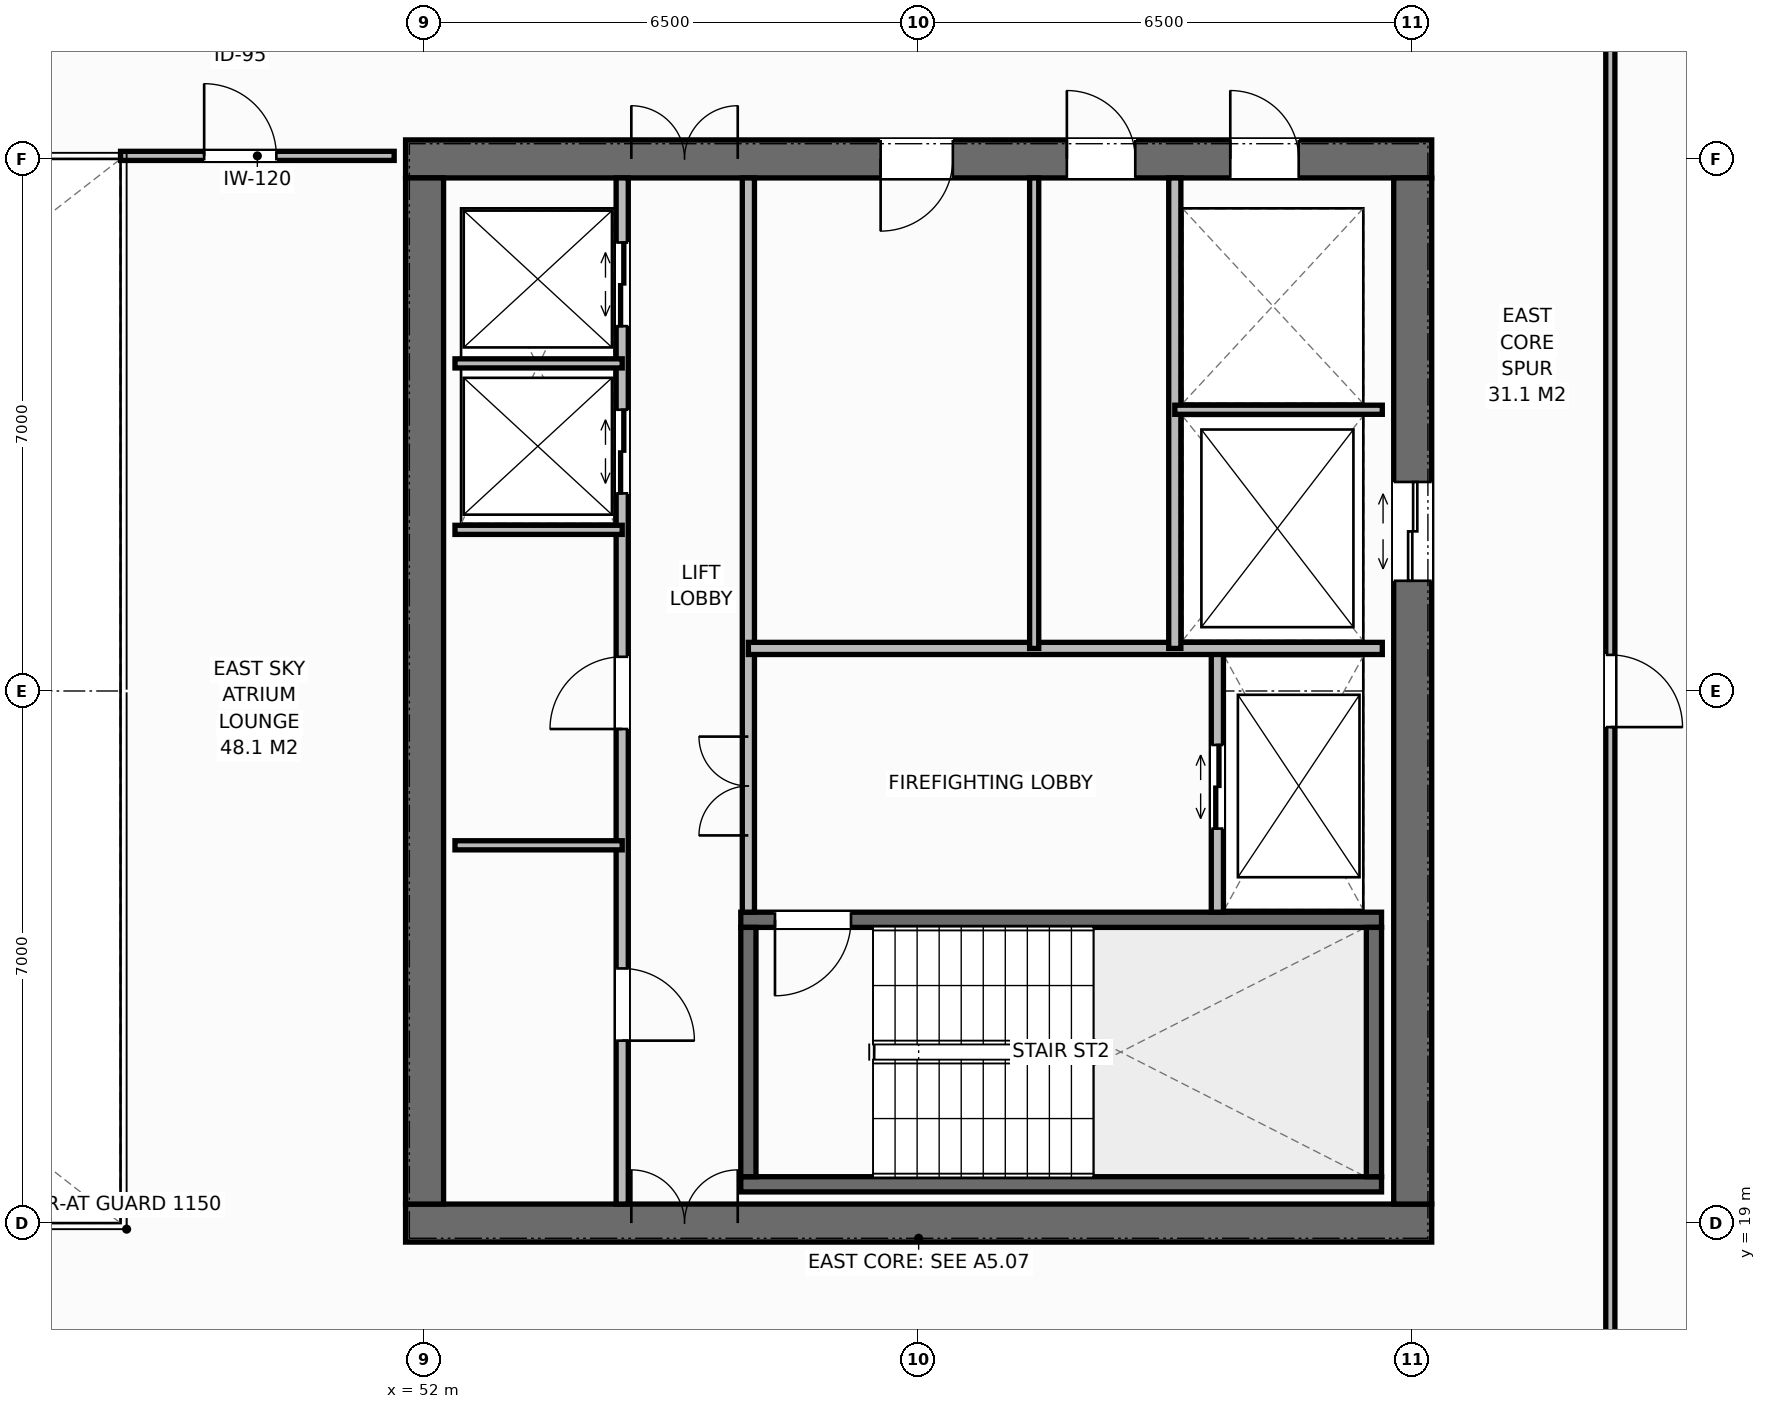
"""IFC4 building model, lengths in metres.
Left out: names, types, materials, properties, quantities, classifications, styles, units other than length and angle.
Written with IfcOpenShell. Run it as: python <this file> out.ifc"""

import sys

from ifc_helpers import new_model, si_unit, direction, frame, frame_2d, origin, place, context, subcontext, project, spatial, rectangle, extrude, element, fill, save


model = new_model("IFC4")
c1 = context("Model", 3, precision=1e-05, world=origin(), true_north=direction((0.0, 1.0)))
c2 = subcontext(c1, "Body", "Model", "MODEL_VIEW")
j1 = project(units=[si_unit("LENGTHUNIT", "METRE"), si_unit("PLANEANGLEUNIT", "RADIAN")], contexts=[c1])
p1 = place(None, origin())
s1 = spatial("IfcSite", under=j1, at=p1, CompositionType="ELEMENT")
p2 = place(p1, origin())
s2 = spatial("IfcBuilding", under=s1, at=p2, CompositionType="ELEMENT")
p3 = place(p2, frame((0.0, 0.0, 229.0)))
s3 = spatial("IfcBuildingStorey", under=s2, at=p3, CompositionType="ELEMENT", Elevation=229.0)
p4 = place(p3, frame((51.75, 19.0, 0.0), z_axis=(0.0, 0.0, 1.0), x_axis=(1.0, 0.0, 0.0)))
e1 = element("IfcWall", 1, at=p4, inside=s3, PredefinedType="SHEAR", context=c2, shape_type="SweptSolid", body=[
    extrude(rectangle(XDim=13.5, YDim=0.5, at=frame_2d((6.75, 0.0))), origin(), (0.0, 0.0, 1.0), 3.8),
])
p5 = place(p4, frame((2.97, 0.0, 0.0)))
e2 = element("IfcOpeningElement", 2, at=p5, cuts=e1, PredefinedType="OPENING", context=c2, shape_type="SweptSolid", body=[
    extrude(rectangle(XDim=1.4, YDim=2.2, at=frame_2d((0.7, 1.1))), frame((0.0, 0.26, 0.0), z_axis=(0.0, -1.0, 0.0), x_axis=(1.0, 0.0, 0.0)), (0.0, 0.0, 1.0), 0.52),
])
p6 = place(p3, frame((51.75, 33.0, 0.0), z_axis=(0.0, 0.0, 1.0), x_axis=(1.0, 0.0, 0.0)))
e3 = element("IfcWall", 3, at=p6, inside=s3, PredefinedType="SHEAR", context=c2, shape_type="SweptSolid", body=[
    extrude(rectangle(XDim=13.5, YDim=0.5, at=frame_2d((6.75, 0.0))), origin(), (0.0, 0.0, 1.0), 3.8),
])
p7 = place(p6, frame((2.97, 0.0, 0.0)))
e4 = element("IfcOpeningElement", 4, at=p7, cuts=e3, PredefinedType="OPENING", context=c2, shape_type="SweptSolid", body=[
    extrude(rectangle(XDim=1.4, YDim=2.2, at=frame_2d((0.7, 1.1))), frame((0.0, 0.26, 0.0), z_axis=(0.0, -1.0, 0.0), x_axis=(1.0, 0.0, 0.0)), (0.0, 0.0, 1.0), 0.52),
])
p8 = place(p6, frame((10.85, 0.0, 0.0)))
e5 = element("IfcOpeningElement", 5, at=p8, cuts=e3, PredefinedType="OPENING", context=c2, shape_type="SweptSolid", body=[
    extrude(rectangle(XDim=0.9, YDim=2.15, at=frame_2d((0.45, 1.075))), frame((0.0, 0.26, 0.0), z_axis=(0.0, -1.0, 0.0), x_axis=(1.0, 0.0, 0.0)), (0.0, 0.0, 1.0), 0.52),
])
p9 = place(p6, frame((6.25, 0.0, 0.0)))
e6 = element("IfcOpeningElement", 6, at=p9, cuts=e3, PredefinedType="OPENING", context=c2, shape_type="SweptSolid", body=[
    extrude(rectangle(XDim=0.95, YDim=2.15, at=frame_2d((0.475, 1.075))), frame((0.0, 0.26, 0.0), z_axis=(0.0, -1.0, 0.0), x_axis=(1.0, 0.0, 0.0)), (0.0, 0.0, 1.0), 0.52),
])
p10 = place(p6, frame((8.7, 0.0, 0.0)))
e7 = element("IfcOpeningElement", 7, at=p10, cuts=e3, PredefinedType="OPENING", context=c2, shape_type="SweptSolid", body=[
    extrude(rectangle(XDim=0.9, YDim=2.15, at=frame_2d((0.45, 1.075))), frame((0.0, 0.26, 0.0), z_axis=(0.0, -1.0, 0.0), x_axis=(1.0, 0.0, 0.0)), (0.0, 0.0, 1.0), 0.52),
])
p11 = place(p3, frame((52.0, 19.25, 0.0), z_axis=(0.0, 0.0, 1.0), x_axis=(0.0, 1.0, 0.0)))
e8 = element("IfcWall", 8, at=p11, inside=s3, PredefinedType="SHEAR", context=c2, shape_type="SweptSolid", body=[
    extrude(rectangle(XDim=13.5, YDim=0.5, at=frame_2d((6.75, 0.0))), origin(), (0.0, 0.0, 1.0), 3.8),
])
p12 = place(p3, frame((65.0, 19.25, 0.0), z_axis=(0.0, 0.0, 1.0), x_axis=(0.0, 1.0, 0.0)))
e9 = element("IfcWall", 9, at=p12, inside=s3, PredefinedType="SHEAR", context=c2, shape_type="SweptSolid", body=[
    extrude(rectangle(XDim=13.5, YDim=0.5, at=frame_2d((6.75, 0.0))), origin(), (0.0, 0.0, 1.0), 3.8),
])
p13 = place(p12, frame((8.2, 0.0, 0.0)))
e10 = element("IfcOpeningElement", 10, at=p13, cuts=e9, PredefinedType="OPENING", context=c2, shape_type="SweptSolid", body=[
    extrude(rectangle(XDim=1.3, YDim=2.2, at=frame_2d((0.65, 1.1))), frame((0.0, 0.26, 0.0), z_axis=(0.0, -1.0, 0.0), x_axis=(1.0, 0.0, 0.0)), (0.0, 0.0, 1.0), 0.52),
])
p14 = place(p3, frame((56.16, 19.51, 0.0), z_axis=(0.0, 0.0, 1.0), x_axis=(1.0, 0.0, 0.0)))
e11 = element("IfcWall", 11, at=p14, inside=s3, PredefinedType="SHEAR", context=c2, shape_type="SweptSolid", body=[
    extrude(rectangle(XDim=8.43, YDim=0.2, at=frame_2d((4.215, 0.0))), origin(), (0.0, 0.0, 1.0), 3.8),
])
p15 = place(p3, frame((56.16, 22.99, 0.0), z_axis=(0.0, 0.0, 1.0), x_axis=(1.0, 0.0, 0.0)))
e12 = element("IfcWall", 12, at=p15, inside=s3, PredefinedType="SHEAR", context=c2, shape_type="SweptSolid", body=[
    extrude(rectangle(XDim=8.43, YDim=0.2, at=frame_2d((4.215, 0.0))), origin(), (0.0, 0.0, 1.0), 3.8),
])
p16 = place(p15, frame((0.45, 0.0, 0.0)))
e13 = element("IfcOpeningElement", 13, at=p16, cuts=e12, PredefinedType="OPENING", context=c2, shape_type="SweptSolid", body=[
    extrude(rectangle(XDim=1.0, YDim=2.15, at=frame_2d((0.5, 1.075))), frame((0.0, 0.11, 0.0), z_axis=(0.0, -1.0, 0.0), x_axis=(1.0, 0.0, 0.0)), (0.0, 0.0, 1.0), 0.22),
])
for number, where, z_axis, x_axis in (
    (14, (56.26, 19.61, 0.0), (0.0, 0.0, 1.0), (0.0, 1.0, 0.0)),
    (15, (64.49, 19.61, 0.0), (0.0, 0.0, 1.0), (0.0, 1.0, 0.0)),
):
    element("IfcWall", number, at=place(p3, frame(where, z_axis=z_axis, x_axis=x_axis)), inside=s3, PredefinedType="SHEAR", context=c2, shape_type="SweptSolid", body=[
        extrude(rectangle(XDim=3.28, YDim=0.2, at=frame_2d((1.64, 0.0))), origin(), (0.0, 0.0, 1.0), 3.8),
    ])
p17 = place(p3, frame((54.6, 19.25, 0.0), z_axis=(0.0, 0.0, 1.0), x_axis=(0.0, 1.0, 0.0)))
e16 = element("IfcWall", 16, at=p17, inside=s3, PredefinedType="STANDARD", context=c2, shape_type="SweptSolid", body=[
    extrude(rectangle(XDim=13.5, YDim=0.16, at=frame_2d((6.75, 0.0))), origin(), (0.0, 0.0, 1.0), 3.58),
])
p18 = place(p17, frame((2.15, 0.0, 0.0)))
e17 = element("IfcOpeningElement", 17, at=p18, cuts=e16, PredefinedType="OPENING", context=c2, shape_type="SweptSolid", body=[
    extrude(rectangle(XDim=0.95, YDim=2.15, at=frame_2d((0.475, 1.075))), frame((0.0, 0.09, 0.0), z_axis=(0.0, -1.0, 0.0), x_axis=(1.0, 0.0, 0.0)), (0.0, 0.0, 1.0), 0.18),
])
p19 = place(p17, frame((6.25, 0.0, 0.0)))
e18 = element("IfcOpeningElement", 18, at=p19, cuts=e16, PredefinedType="OPENING", context=c2, shape_type="SweptSolid", body=[
    extrude(rectangle(XDim=0.95, YDim=2.15, at=frame_2d((0.475, 1.075))), frame((0.0, 0.09, 0.0), z_axis=(0.0, -1.0, 0.0), x_axis=(1.0, 0.0, 0.0)), (0.0, 0.0, 1.0), 0.18),
])
p20 = place(p17, frame((9.35, 0.0, 0.0)))
e19 = element("IfcOpeningElement", 19, at=p20, cuts=e16, PredefinedType="OPENING", context=c2, shape_type="SweptSolid", body=[
    extrude(rectangle(XDim=1.1, YDim=2.2, at=frame_2d((0.55, 1.1))), frame((0.0, 0.09, 0.0), z_axis=(0.0, -1.0, 0.0), x_axis=(1.0, 0.0, 0.0)), (0.0, 0.0, 1.0), 0.18),
])
p21 = place(p17, frame((11.55, 0.0, 0.0)))
e20 = element("IfcOpeningElement", 20, at=p21, cuts=e16, PredefinedType="OPENING", context=c2, shape_type="SweptSolid", body=[
    extrude(rectangle(XDim=1.1, YDim=2.2, at=frame_2d((0.55, 1.1))), frame((0.0, 0.09, 0.0), z_axis=(0.0, -1.0, 0.0), x_axis=(1.0, 0.0, 0.0)), (0.0, 0.0, 1.0), 0.18),
])
p22 = place(p3, frame((56.26, 23.09, 0.0), z_axis=(0.0, 0.0, 1.0), x_axis=(0.0, 1.0, 0.0)))
e21 = element("IfcWall", 21, at=p22, inside=s3, PredefinedType="STANDARD", context=c2, shape_type="SweptSolid", body=[
    extrude(rectangle(XDim=9.66, YDim=0.16, at=frame_2d((4.83, 0.0))), origin(), (0.0, 0.0, 1.0), 3.58),
])
p23 = place(p22, frame((1.01, 0.0, 0.0)))
e22 = element("IfcOpeningElement", 22, at=p23, cuts=e21, PredefinedType="OPENING", context=c2, shape_type="SweptSolid", body=[
    extrude(rectangle(XDim=1.3, YDim=2.2, at=frame_2d((0.65, 1.1))), frame((0.0, 0.09, 0.0), z_axis=(0.0, -1.0, 0.0), x_axis=(1.0, 0.0, 0.0)), (0.0, 0.0, 1.0), 0.18),
])
for number, where, z_axis, x_axis in (
    (23, (52.4, 23.97, 0.0), (0.0, 0.0, 1.0), (1.0, 0.0, 0.0)),
    (24, (52.4, 28.12, 0.0), (0.0, 0.0, 1.0), (1.0, 0.0, 0.0)),
    (25, (52.4, 30.31, 0.0), (0.0, 0.0, 1.0), (1.0, 0.0, 0.0)),
):
    element("IfcWall", number, at=place(p3, frame(where, z_axis=z_axis, x_axis=x_axis)), inside=s3, PredefinedType="PARTITIONING", context=c2, shape_type="SweptSolid", body=[
        extrude(rectangle(XDim=2.2, YDim=0.12, at=frame_2d((1.1, 0.0))), origin(), (0.0, 0.0, 1.0), 3.58),
    ])
p24 = place(p3, frame((62.43, 23.09, 0.0), z_axis=(0.0, 0.0, 1.0), x_axis=(0.0, 1.0, 0.0)))
e26 = element("IfcWall", 26, at=p24, inside=s3, PredefinedType="STANDARD", context=c2, shape_type="SweptSolid", body=[
    extrude(rectangle(XDim=3.47, YDim=0.16, at=frame_2d((1.735, 0.0))), origin(), (0.0, 0.0, 1.0), 3.58),
])
p25 = place(p24, frame((1.1, 0.0, 0.0)))
e27 = element("IfcOpeningElement", 27, at=p25, cuts=e26, PredefinedType="OPENING", context=c2, shape_type="SweptSolid", body=[
    extrude(rectangle(XDim=1.1, YDim=2.2, at=frame_2d((0.55, 1.1))), frame((0.0, 0.09, 0.0), z_axis=(0.0, -1.0, 0.0), x_axis=(1.0, 0.0, 0.0)), (0.0, 0.0, 1.0), 0.18),
])
p26 = place(p3, frame((56.26, 26.56, 0.0), z_axis=(0.0, 0.0, 1.0), x_axis=(1.0, 0.0, 0.0)))
e28 = element("IfcWall", 28, at=p26, inside=s3, PredefinedType="STANDARD", context=c2, shape_type="SweptSolid", body=[
    extrude(rectangle(XDim=8.34, YDim=0.16, at=frame_2d((4.17, 0.0))), origin(), (0.0, 0.0, 1.0), 3.58),
])
p27 = place(p3, frame((61.87, 26.56, 0.0), z_axis=(0.0, 0.0, 1.0), x_axis=(0.0, 1.0, 0.0)))
e29 = element("IfcWall", 29, at=p27, inside=s3, PredefinedType="STANDARD", context=c2, shape_type="SweptSolid", body=[
    extrude(rectangle(XDim=6.19, YDim=0.16, at=frame_2d((3.095, 0.0))), origin(), (0.0, 0.0, 1.0), 3.58),
])
p28 = place(p3, frame((61.87, 29.7, 0.0), z_axis=(0.0, 0.0, 1.0), x_axis=(1.0, 0.0, 0.0)))
e30 = element("IfcWall", 30, at=p28, inside=s3, PredefinedType="PARTITIONING", context=c2, shape_type="SweptSolid", body=[
    extrude(rectangle(XDim=2.73, YDim=0.12, at=frame_2d((1.365, 0.0))), origin(), (0.0, 0.0, 1.0), 3.58),
])
p29 = place(p3, frame((60.02, 26.56, 0.0), z_axis=(0.0, 0.0, 1.0), x_axis=(0.0, 1.0, 0.0)))
e31 = element("IfcWall", 31, at=p29, inside=s3, PredefinedType="PARTITIONING", context=c2, shape_type="SweptSolid", body=[
    extrude(rectangle(XDim=6.19, YDim=0.12, at=frame_2d((3.095, 0.0))), origin(), (0.0, 0.0, 1.0), 3.58),
])
p30 = place(p3, frame((48.0, 33.04, 0.0), z_axis=(0.0, 0.0, 1.0), x_axis=(1.0, 0.0, 0.0)))
e32 = element("IfcWall", 32, at=p30, inside=s3, PredefinedType="PARTITIONING", context=c2, shape_type="SweptSolid", body=[
    extrude(rectangle(XDim=3.6, YDim=0.12, at=frame_2d((1.8, 0.0))), origin(), (0.0, 0.0, 1.0), 3.32),
])
p31 = place(p30, frame((1.1, 0.0, 0.0)))
e33 = element("IfcOpeningElement", 33, at=p31, cuts=e32, PredefinedType="OPENING", context=c2, shape_type="SweptSolid", body=[
    extrude(rectangle(XDim=0.95, YDim=2.15, at=frame_2d((0.475, 1.075))), frame((0.0, 0.07, 0.0), z_axis=(0.0, -1.0, 0.0), x_axis=(1.0, 0.0, 0.0)), (0.0, 0.0, 1.0), 0.14),
])
p32 = place(p3, frame((67.6, 16.5, 0.0), z_axis=(0.0, 0.0, 1.0), x_axis=(0.0, 1.0, 0.0)))
e34 = element("IfcWall", 34, at=p32, inside=s3, PredefinedType="PARTITIONING", context=c2, shape_type="SweptSolid", body=[
    extrude(rectangle(XDim=19.0, YDim=0.12, at=frame_2d((9.5, 0.0))), origin(), (0.0, 0.0, 1.0), 3.58),
])
p33 = place(p32, frame((9.025, 0.0, 0.0)))
e35 = element("IfcOpeningElement", 35, at=p33, cuts=e34, PredefinedType="OPENING", context=c2, shape_type="SweptSolid", body=[
    extrude(rectangle(XDim=0.95, YDim=2.15, at=frame_2d((0.475, 1.075))), frame((0.0, 0.07, 0.0), z_axis=(0.0, -1.0, 0.0), x_axis=(1.0, 0.0, 0.0)), (0.0, 0.0, 1.0), 0.14),
])
p34 = place(p5, origin())
e36 = element("IfcDoor", 36, at=p34, inside=s3, OperationType="DOUBLE_DOOR_SINGLE_SWING", PredefinedType="DOOR", context=c2, shape_type="SweptSolid", body=[
    extrude(rectangle(XDim=1.4, YDim=2.2, at=frame_2d((0.7, 1.1))), frame((0.0, 0.075, 0.0), z_axis=(0.0, -1.0, 0.0), x_axis=(1.0, 0.0, 0.0)), (0.0, 0.0, 1.0), 0.05),
])
fill(e2, e36)
p35 = place(p7, origin())
e37 = element("IfcDoor", 37, at=p35, inside=s3, OperationType="DOUBLE_DOOR_SINGLE_SWING", PredefinedType="DOOR", context=c2, shape_type="SweptSolid", body=[
    extrude(rectangle(XDim=1.4, YDim=2.2, at=frame_2d((0.7, 1.1))), frame((0.0, -0.025, 0.0), z_axis=(0.0, -1.0, 0.0), x_axis=(1.0, 0.0, 0.0)), (0.0, 0.0, 1.0), 0.05),
])
fill(e4, e37)
p36 = place(p18, origin())
e38 = element("IfcDoor", 38, at=p36, inside=s3, OperationType="SINGLE_SWING_RIGHT", PredefinedType="DOOR", context=c2, shape_type="SweptSolid", body=[
    extrude(rectangle(XDim=0.95, YDim=2.15, at=frame_2d((0.475, 1.075))), frame((0.0, 0.025, 0.0), z_axis=(0.0, -1.0, 0.0), x_axis=(1.0, 0.0, 0.0)), (0.0, 0.0, 1.0), 0.05),
])
fill(e17, e38)
p37 = place(p19, origin())
e39 = element("IfcDoor", 39, at=p37, inside=s3, OperationType="SINGLE_SWING_LEFT", PredefinedType="DOOR", context=c2, shape_type="SweptSolid", body=[
    extrude(rectangle(XDim=0.95, YDim=2.15, at=frame_2d((0.475, 1.075))), frame((0.0, 0.025, 0.0), z_axis=(0.0, -1.0, 0.0), x_axis=(1.0, 0.0, 0.0)), (0.0, 0.0, 1.0), 0.05),
])
fill(e18, e39)
p38 = place(p20, origin())
e40 = element("IfcDoor", 40, at=p38, inside=s3, OperationType="DOUBLE_DOOR_SLIDING", PredefinedType="DOOR", context=c2, shape_type="SweptSolid", body=[
    extrude(rectangle(XDim=1.1, YDim=2.2, at=frame_2d((0.55, 1.1))), frame((0.0, 0.025, 0.0), z_axis=(0.0, -1.0, 0.0), x_axis=(1.0, 0.0, 0.0)), (0.0, 0.0, 1.0), 0.05),
])
fill(e19, e40)
p39 = place(p21, origin())
e41 = element("IfcDoor", 41, at=p39, inside=s3, OperationType="DOUBLE_DOOR_SLIDING", PredefinedType="DOOR", context=c2, shape_type="SweptSolid", body=[
    extrude(rectangle(XDim=1.1, YDim=2.2, at=frame_2d((0.55, 1.1))), frame((0.0, 0.025, 0.0), z_axis=(0.0, -1.0, 0.0), x_axis=(1.0, 0.0, 0.0)), (0.0, 0.0, 1.0), 0.05),
])
fill(e20, e41)
p40 = place(p16, origin())
e42 = element("IfcDoor", 42, at=p40, inside=s3, OperationType="SINGLE_SWING_RIGHT", PredefinedType="DOOR", context=c2, shape_type="SweptSolid", body=[
    extrude(rectangle(XDim=1.0, YDim=2.15, at=frame_2d((0.5, 1.075))), frame((0.0, 0.025, 0.0), z_axis=(0.0, -1.0, 0.0), x_axis=(1.0, 0.0, 0.0)), (0.0, 0.0, 1.0), 0.05),
])
fill(e13, e42)
p41 = place(p25, origin())
e43 = element("IfcDoor", 43, at=p41, inside=s3, OperationType="DOUBLE_DOOR_SLIDING", PredefinedType="DOOR", context=c2, shape_type="SweptSolid", body=[
    extrude(rectangle(XDim=1.1, YDim=2.2, at=frame_2d((0.55, 1.1))), frame((0.0, 0.025, 0.0), z_axis=(0.0, -1.0, 0.0), x_axis=(1.0, 0.0, 0.0)), (0.0, 0.0, 1.0), 0.05),
])
fill(e27, e43)
p42 = place(p23, origin())
e44 = element("IfcDoor", 44, at=p42, inside=s3, OperationType="DOUBLE_DOOR_SINGLE_SWING", PredefinedType="DOOR", context=c2, shape_type="SweptSolid", body=[
    extrude(rectangle(XDim=1.3, YDim=2.2, at=frame_2d((0.65, 1.1))), frame((0.0, 0.025, 0.0), z_axis=(0.0, -1.0, 0.0), x_axis=(1.0, 0.0, 0.0)), (0.0, 0.0, 1.0), 0.05),
])
fill(e22, e44)
p43 = place(p13, origin())
e45 = element("IfcDoor", 45, at=p43, inside=s3, OperationType="DOUBLE_DOOR_SLIDING", PredefinedType="DOOR", context=c2, shape_type="SweptSolid", body=[
    extrude(rectangle(XDim=1.3, YDim=2.2, at=frame_2d((0.65, 1.1))), frame((0.0, 0.025, 0.0), z_axis=(0.0, -1.0, 0.0), x_axis=(1.0, 0.0, 0.0)), (0.0, 0.0, 1.0), 0.05),
])
fill(e10, e45)
p44 = place(p8, origin())
e46 = element("IfcDoor", 46, at=p44, inside=s3, OperationType="SINGLE_SWING_LEFT", PredefinedType="DOOR", context=c2, shape_type="SweptSolid", body=[
    extrude(rectangle(XDim=0.9, YDim=2.15, at=frame_2d((0.45, 1.075))), frame((0.0, -0.025, 0.0), z_axis=(0.0, -1.0, 0.0), x_axis=(1.0, 0.0, 0.0)), (0.0, 0.0, 1.0), 0.05),
])
fill(e5, e46)
p45 = place(p9, origin())
e47 = element("IfcDoor", 47, at=p45, inside=s3, OperationType="SINGLE_SWING_RIGHT", PredefinedType="DOOR", context=c2, shape_type="SweptSolid", body=[
    extrude(rectangle(XDim=0.95, YDim=2.15, at=frame_2d((0.475, 1.075))), frame((0.0, -0.025, 0.0), z_axis=(0.0, -1.0, 0.0), x_axis=(1.0, 0.0, 0.0)), (0.0, 0.0, 1.0), 0.05),
])
fill(e6, e47)
p46 = place(p10, origin())
e48 = element("IfcDoor", 48, at=p46, inside=s3, OperationType="SINGLE_SWING_LEFT", PredefinedType="DOOR", context=c2, shape_type="SweptSolid", body=[
    extrude(rectangle(XDim=0.9, YDim=2.15, at=frame_2d((0.45, 1.075))), frame((0.0, -0.025, 0.0), z_axis=(0.0, -1.0, 0.0), x_axis=(1.0, 0.0, 0.0)), (0.0, 0.0, 1.0), 0.05),
])
fill(e7, e48)
p47 = place(p31, origin())
e49 = element("IfcDoor", 49, at=p47, inside=s3, OperationType="SINGLE_SWING_LEFT", PredefinedType="DOOR", context=c2, shape_type="SweptSolid", body=[
    extrude(rectangle(XDim=0.95, YDim=2.15, at=frame_2d((0.475, 1.075))), frame((0.0, 0.025, 0.0), z_axis=(0.0, -1.0, 0.0), x_axis=(1.0, 0.0, 0.0)), (0.0, 0.0, 1.0), 0.05),
])
fill(e33, e49)
p48 = place(p33, origin())
e50 = element("IfcDoor", 50, at=p48, inside=s3, OperationType="SINGLE_SWING_RIGHT", PredefinedType="DOOR", context=c2, shape_type="SweptSolid", body=[
    extrude(rectangle(XDim=0.95, YDim=2.15, at=frame_2d((0.475, 1.075))), frame((0.0, 0.025, 0.0), z_axis=(0.0, -1.0, 0.0), x_axis=(1.0, 0.0, 0.0)), (0.0, 0.0, 1.0), 0.05),
])
fill(e35, e50)
save(model, sys.argv[1])
